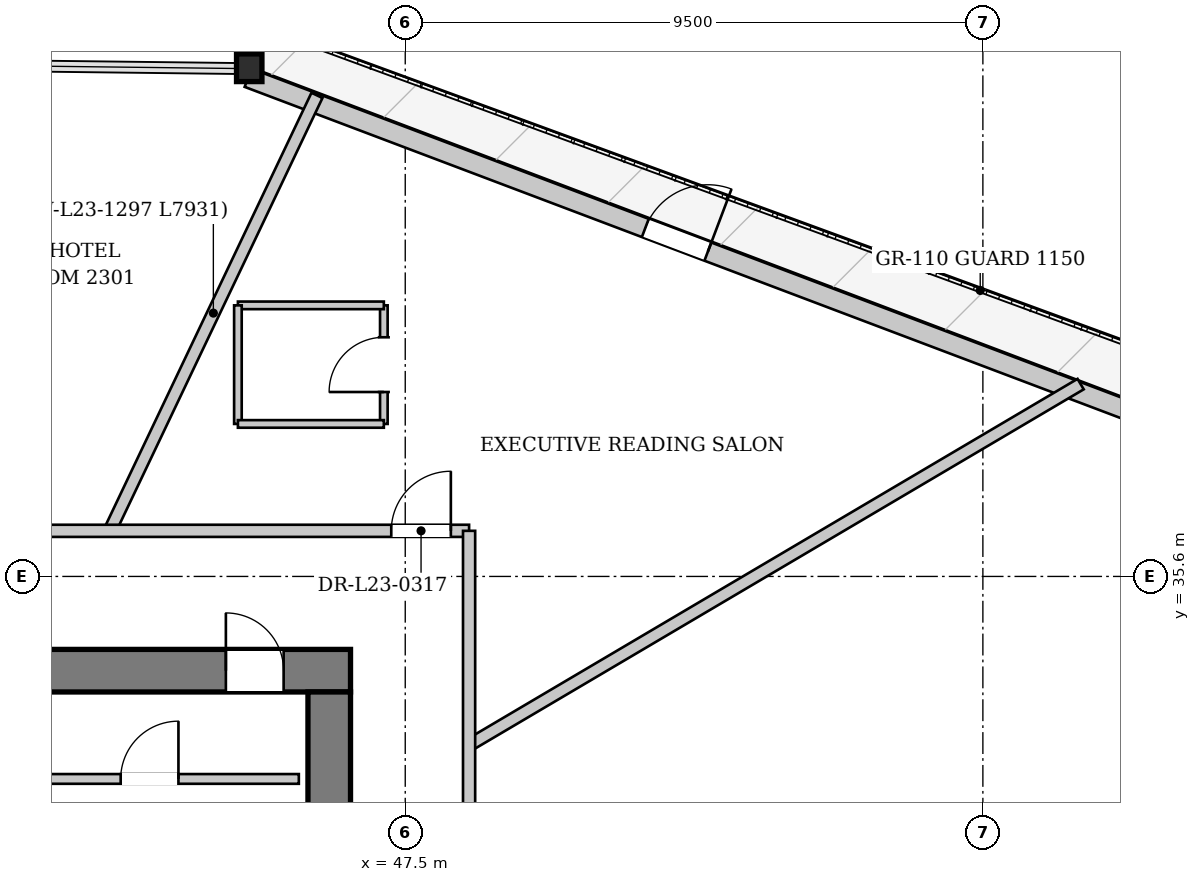
"""IFC4 building model, lengths in metres.
Left out: names, types, materials, properties, quantities, classifications, styles, units other than length and angle.
Written with IfcOpenShell. Run it as: python <this file> out.ifc"""

import sys

from ifc_helpers import new_model, si_unit, direction, frame, frame_2d, origin, origin_2d, place, context, subcontext, project, spatial, rectangle, i_section, extrude, source, transform, mapped, element, fill, save


model = new_model("IFC4")
c1 = context("Model", 3, precision=1e-05, world=origin(), true_north=direction((0.0, 1.0)))
c2 = subcontext(c1, "Body", "Model", "MODEL_VIEW")
j1 = project(units=[si_unit("LENGTHUNIT", "METRE"), si_unit("PLANEANGLEUNIT", "RADIAN")], contexts=[c1])
p1 = place(None, origin())
s1 = spatial("IfcSite", under=j1, at=p1, CompositionType="ELEMENT")
p2 = place(p1, origin())
s2 = spatial("IfcBuilding", under=s1, at=p2, CompositionType="ELEMENT")
p3 = place(p2, frame((0.0, 0.0, 91.5)))
s3 = spatial("IfcBuildingStorey", under=s2, at=p3, CompositionType="ELEMENT", Elevation=91.5)
m1 = source(origin(), c2, "Body", "SweptSolid", [
    extrude(i_section(OverallWidth=0.418, OverallDepth=0.455, WebThickness=0.038, FlangeThickness=0.059, at=origin_2d()), origin(), (0.0, 0.0, 1.0), 3.386),
])
p4 = place(p3, frame((44.972, 43.95, 0.0), z_axis=(-0.022424043653, 0.008940776247, 0.999708569927), x_axis=(-0.370360524269, -0.928888089095, 0.0)))
e1 = element("IfcColumn", 1, at=p4, inside=s3, PredefinedType="COLUMN", context=c2, shape_type="MappedRepresentation", body=[
    mapped(m1, transform((0.0, 0.0, 0.0), x_axis=(1.0, 0.0, 0.0), y_axis=(0.0, 1.0, 0.0), z_axis=(0.0, 0.0, 1.0), scale=1.0)),
])
p5 = place(p3, frame((44.916, 43.801, 0.0), z_axis=(0.0, 0.0, 1.0), x_axis=(0.935383996815, -0.353633678404, 0.0)))
e2 = element("IfcWall", 2, at=p5, inside=s3, PredefinedType="SOLIDWALL", context=c2, shape_type="SweptSolid", body=[
    extrude(rectangle(XDim=23.543, YDim=0.32, at=frame_2d((11.771, 0.0))), origin(), (0.0, 0.0, 1.0), 2.692),
])
p6 = place(p5, frame((6.984, 0.0, 0.0)))
e3 = element("IfcOpeningElement", 3, at=p6, cuts=e2, PredefinedType="OPENING", context=c2, shape_type="SweptSolid", body=[
    extrude(rectangle(XDim=1.1, YDim=2.3, at=frame_2d((0.55, 1.15))), frame((0.0, 0.17, 0.0), z_axis=(0.0, -1.0, 0.0), x_axis=(1.0, 0.0, 0.0)), (0.0, 0.0, 1.0), 0.34),
])
p7 = place(p5, frame((16.522, 0.0, 0.372)))
e4 = element("IfcOpeningElement", 4, at=p7, cuts=e2, PredefinedType="OPENING", context=c2, shape_type="SweptSolid", body=[
    extrude(rectangle(XDim=1.8, YDim=2.2, at=frame_2d((0.9, 1.1))), frame((0.0, 0.17, 0.0), z_axis=(0.0, -1.0, 0.0), x_axis=(1.0, 0.0, 0.0)), (0.0, 0.0, 1.0), 0.34),
])
p8 = place(p3, frame((29.4, 34.05, 0.0), z_axis=(0.0, 0.0, 1.0), x_axis=(1.0, 0.0, 0.0)))
e5 = element("IfcWall", 5, at=p8, inside=s3, PredefinedType="SHEAR", context=c2, shape_type="SweptSolid", body=[
    extrude(rectangle(XDim=17.2, YDim=0.7, at=frame_2d((8.6, 0.0))), origin(), (0.0, 0.0, 1.0), 3.3),
])
p9 = place(p8, frame((1.7, 0.0, 0.0)))
e6 = element("IfcOpeningElement", 6, at=p9, cuts=e5, PredefinedType="OPENING", context=c2, shape_type="SweptSolid", body=[
    extrude(rectangle(XDim=0.95, YDim=2.1, at=frame_2d((0.475, 1.05))), frame((0.0, 0.36, 0.0), z_axis=(0.0, -1.0, 0.0), x_axis=(1.0, 0.0, 0.0)), (0.0, 0.0, 1.0), 0.72),
])
p10 = place(p8, frame((4.08, 0.0, 0.0)))
e7 = element("IfcOpeningElement", 7, at=p10, cuts=e5, PredefinedType="OPENING", context=c2, shape_type="SweptSolid", body=[
    extrude(rectangle(XDim=1.32, YDim=2.2, at=frame_2d((0.66, 1.1))), frame((0.0, 0.36, 0.0), z_axis=(0.0, -1.0, 0.0), x_axis=(1.0, 0.0, 0.0)), (0.0, 0.0, 1.0), 0.72),
])
p11 = place(p8, frame((15.15, 0.0, 0.0)))
e8 = element("IfcOpeningElement", 8, at=p11, cuts=e5, PredefinedType="OPENING", context=c2, shape_type="SweptSolid", body=[
    extrude(rectangle(XDim=0.95, YDim=2.1, at=frame_2d((0.475, 1.05))), frame((0.0, 0.36, 0.0), z_axis=(0.0, -1.0, 0.0), x_axis=(1.0, 0.0, 0.0)), (0.0, 0.0, 1.0), 0.72),
])
p12 = place(p3, frame((46.25, 33.7, 0.0), z_axis=(0.0, 0.0, 1.0), x_axis=(0.0, -1.0, 0.0)))
e9 = element("IfcWall", 9, at=p12, inside=s3, PredefinedType="SHEAR", context=c2, shape_type="SweptSolid", body=[
    extrude(rectangle(XDim=14.2, YDim=0.7, at=frame_2d((7.1, 0.0))), origin(), (0.0, 0.0, 1.0), 3.3),
])
p13 = place(p12, frame((5.18, 0.0, 0.0)))
e10 = element("IfcOpeningElement", 10, at=p13, cuts=e9, PredefinedType="OPENING", context=c2, shape_type="SweptSolid", body=[
    extrude(rectangle(XDim=1.6, YDim=2.2, at=frame_2d((0.8, 1.1))), frame((0.0, 0.36, 0.0), z_axis=(0.0, -1.0, 0.0), x_axis=(1.0, 0.0, 0.0)), (0.0, 0.0, 1.0), 0.72),
])
p14 = place(p3, frame((40.72, 32.27, 0.0), z_axis=(0.0, 0.0, 1.0), x_axis=(1.0, 0.0, 0.0)))
e11 = element("IfcWall", 11, at=p14, inside=s3, PredefinedType="PARTITIONING", context=c2, shape_type="SweptSolid", body=[
    extrude(rectangle(XDim=5.03, YDim=0.16, at=frame_2d((2.515, 0.0))), origin(), (0.0, 0.0, 1.0), 3.3),
])
p15 = place(p14, frame((2.1, 0.0, 0.0)))
e12 = element("IfcOpeningElement", 12, at=p15, cuts=e11, PredefinedType="OPENING", context=c2, shape_type="SweptSolid", body=[
    extrude(rectangle(XDim=0.95, YDim=2.1, at=frame_2d((0.475, 1.05))), frame((0.0, 0.09, 0.0), z_axis=(0.0, -1.0, 0.0), x_axis=(1.0, 0.0, 0.0)), (0.0, 0.0, 1.0), 0.18),
])
p16 = place(p3, frame((42.64, 36.35, 0.0), z_axis=(0.0, 0.0, 1.0), x_axis=(0.429717281703, 0.902963486419, 0.0)))
e13 = element("IfcWall", 13, at=p16, inside=s3, PredefinedType="PARTITIONING", context=c2, shape_type="SweptSolid", body=[
    extrude(rectangle(XDim=7.931, YDim=0.2, at=frame_2d((3.965, 0.0))), origin(), (0.0, 0.0, 1.0), 3.3),
])
p17 = place(p3, frame((48.55, 32.827, 0.0), z_axis=(0.0, 0.0, 1.0), x_axis=(0.861183611316, 0.508293997212, 0.0)))
e14 = element("IfcWall", 14, at=p17, inside=s3, PredefinedType="PARTITIONING", context=c2, shape_type="SweptSolid", body=[
    extrude(rectangle(XDim=11.679, YDim=0.2, at=frame_2d((5.839, 0.0))), origin(), (0.0, 0.0, 1.0), 3.3),
])
p18 = place(p3, frame((47.148, 38.108, 0.0), z_axis=(0.0, 0.0, 1.0), x_axis=(0.0, 1.0, 0.0)))
e15 = element("IfcWall", 15, at=p18, inside=s3, PredefinedType="PARTITIONING", context=c2, shape_type="SweptSolid", body=[
    extrude(rectangle(XDim=1.95, YDim=0.125, at=frame_2d((0.975, 0.0))), origin(), (0.0, 0.0, 1.0), 3.3),
])
p19 = place(p18, frame((0.525, 0.0, 0.0)))
e16 = element("IfcOpeningElement", 16, at=p19, cuts=e15, PredefinedType="OPENING", context=c2, shape_type="SweptSolid", body=[
    extrude(rectangle(XDim=0.9, YDim=2.1, at=frame_2d((0.45, 1.05))), frame((0.0, 0.073, 0.0), z_axis=(0.0, -1.0, 0.0), x_axis=(1.0, 0.0, 0.0)), (0.0, 0.0, 1.0), 0.145),
])
p20 = place(p3, frame((47.148, 40.058, 0.0), z_axis=(0.0, 0.0, 1.0), x_axis=(-1.0, 0.0, 0.0)))
e17 = element("IfcWall", 17, at=p20, inside=s3, PredefinedType="PARTITIONING", context=c2, shape_type="SweptSolid", body=[
    extrude(rectangle(XDim=2.4, YDim=0.125, at=frame_2d((1.2, 0.0))), origin(), (0.0, 0.0, 1.0), 3.3),
])
p21 = place(p3, frame((44.748, 40.058, 0.0), z_axis=(0.0, 0.0, 1.0), x_axis=(0.0, -1.0, 0.0)))
e18 = element("IfcWall", 18, at=p21, inside=s3, PredefinedType="PARTITIONING", context=c2, shape_type="SweptSolid", body=[
    extrude(rectangle(XDim=1.95, YDim=0.125, at=frame_2d((0.975, 0.0))), origin(), (0.0, 0.0, 1.0), 3.3),
])
p22 = place(p3, frame((44.748, 38.108, 0.0), z_axis=(0.0, 0.0, 1.0), x_axis=(1.0, 0.0, 0.0)))
e19 = element("IfcWall", 19, at=p22, inside=s3, PredefinedType="PARTITIONING", context=c2, shape_type="SweptSolid", body=[
    extrude(rectangle(XDim=2.4, YDim=0.125, at=frame_2d((1.2, 0.0))), origin(), (0.0, 0.0, 1.0), 2.985),
])
p23 = place(p3, frame((27.45, 36.35, 0.0), z_axis=(0.0, 0.0, 1.0), x_axis=(1.0, 0.0, 0.0)))
e20 = element("IfcWall", 20, at=p23, inside=s3, PredefinedType="PARTITIONING", context=c2, shape_type="SweptSolid", body=[
    extrude(rectangle(XDim=21.1, YDim=0.2, at=frame_2d((10.55, 0.0))), origin(), (0.0, 0.0, 1.0), 3.3),
])
p24 = place(p23, frame((13.008, 0.0, 0.0)))
e21 = element("IfcOpeningElement", 21, at=p24, cuts=e20, PredefinedType="OPENING", context=c2, shape_type="SweptSolid", body=[
    extrude(rectangle(XDim=0.98, YDim=2.15, at=frame_2d((0.49, 1.075))), frame((0.0, 0.11, 0.0), z_axis=(0.0, -1.0, 0.0), x_axis=(1.0, 0.0, 0.0)), (0.0, 0.0, 1.0), 0.22),
])
p25 = place(p23, frame((1.25, 0.0, 0.0)))
e22 = element("IfcOpeningElement", 22, at=p25, cuts=e20, PredefinedType="OPENING", context=c2, shape_type="SweptSolid", body=[
    extrude(rectangle(XDim=0.98, YDim=2.15, at=frame_2d((0.49, 1.075))), frame((0.0, 0.11, 0.0), z_axis=(0.0, -1.0, 0.0), x_axis=(1.0, 0.0, 0.0)), (0.0, 0.0, 1.0), 0.22),
])
p26 = place(p23, frame((19.82, 0.0, 0.0)))
e23 = element("IfcOpeningElement", 23, at=p26, cuts=e20, PredefinedType="OPENING", context=c2, shape_type="SweptSolid", body=[
    extrude(rectangle(XDim=0.98, YDim=2.15, at=frame_2d((0.49, 1.075))), frame((0.0, 0.11, 0.0), z_axis=(0.0, -1.0, 0.0), x_axis=(1.0, 0.0, 0.0)), (0.0, 0.0, 1.0), 0.22),
])
p27 = place(p3, frame((48.55, 16.85, 0.0), z_axis=(0.0, 0.0, 1.0), x_axis=(0.0, 1.0, 0.0)))
e24 = element("IfcWall", 24, at=p27, inside=s3, PredefinedType="PARTITIONING", context=c2, shape_type="SweptSolid", body=[
    extrude(rectangle(XDim=19.5, YDim=0.2, at=frame_2d((9.75, 0.0))), origin(), (0.0, 0.0, 1.0), 3.3),
])
p28 = place(p27, frame((3.301, 0.0, 0.0)))
e25 = element("IfcOpeningElement", 25, at=p28, cuts=e24, PredefinedType="OPENING", context=c2, shape_type="SweptSolid", body=[
    extrude(rectangle(XDim=0.98, YDim=2.15, at=frame_2d((0.49, 1.075))), frame((0.0, 0.11, 0.0), z_axis=(0.0, -1.0, 0.0), x_axis=(1.0, 0.0, 0.0)), (0.0, 0.0, 1.0), 0.22),
])
p29 = place(p27, frame((11.264, 0.0, 0.0)))
e26 = element("IfcOpeningElement", 26, at=p29, cuts=e24, PredefinedType="OPENING", context=c2, shape_type="SweptSolid", body=[
    extrude(rectangle(XDim=0.98, YDim=2.15, at=frame_2d((0.49, 1.075))), frame((0.0, 0.11, 0.0), z_axis=(0.0, -1.0, 0.0), x_axis=(1.0, 0.0, 0.0)), (0.0, 0.0, 1.0), 0.22),
])
m2 = source(origin(), c2, "Body", "SweptSolid", [
    extrude(rectangle(XDim=1.1, YDim=2.3, at=frame_2d((0.55, 1.15))), frame((0.0, 0.025, 0.0), z_axis=(0.0, -1.0, 0.0), x_axis=(1.0, 0.0, 0.0)), (0.0, 0.0, 1.0), 0.05),
])
p30 = place(p6, origin())
e27 = element("IfcDoor", 27, at=p30, inside=s3, OperationType="SINGLE_SWING_RIGHT", PredefinedType="DOOR", context=c2, shape_type="MappedRepresentation", body=[
    mapped(m2, transform((0.0, 0.0, 0.0), x_axis=(1.0, 0.0, 0.0), y_axis=(0.0, 1.0, 0.0), z_axis=(0.0, 0.0, 1.0), scale=1.0)),
])
fill(e3, e27)
m3 = source(origin(), c2, "Body", "SweptSolid", [
    extrude(rectangle(XDim=0.95, YDim=2.1, at=frame_2d((0.475, 1.05))), frame((0.0, 0.025, 0.0), z_axis=(0.0, -1.0, 0.0), x_axis=(1.0, 0.0, 0.0)), (0.0, 0.0, 1.0), 0.05),
])
p31 = place(p15, origin())
e28 = element("IfcDoor", 28, at=p31, inside=s3, OperationType="SINGLE_SWING_RIGHT", PredefinedType="DOOR", context=c2, shape_type="MappedRepresentation", body=[
    mapped(m3, transform((0.0, 0.0, 0.0), x_axis=(1.0, 0.0, 0.0), y_axis=(0.0, 1.0, 0.0), z_axis=(0.0, 0.0, 1.0), scale=1.0)),
])
fill(e12, e28)
p32 = place(p11, origin())
e29 = element("IfcDoor", 29, at=p32, inside=s3, OperationType="SINGLE_SWING_LEFT", PredefinedType="DOOR", context=c2, shape_type="MappedRepresentation", body=[
    mapped(m3, transform((0.0, 0.0, 0.0), x_axis=(1.0, 0.0, 0.0), y_axis=(0.0, 1.0, 0.0), z_axis=(0.0, 0.0, 1.0), scale=1.0)),
])
fill(e8, e29)
m4 = source(origin(), c2, "Body", "SweptSolid", [
    extrude(rectangle(XDim=0.9, YDim=2.1, at=frame_2d((0.45, 1.05))), frame((0.0, 0.025, 0.0), z_axis=(0.0, -1.0, 0.0), x_axis=(1.0, 0.0, 0.0)), (0.0, 0.0, 1.0), 0.05),
])
p33 = place(p19, origin())
e30 = element("IfcDoor", 30, at=p33, inside=s3, OperationType="SINGLE_SWING_LEFT", PredefinedType="DOOR", context=c2, shape_type="MappedRepresentation", body=[
    mapped(m4, transform((0.0, 0.0, 0.0), x_axis=(1.0, 0.0, 0.0), y_axis=(0.0, 1.0, 0.0), z_axis=(0.0, 0.0, 1.0), scale=1.0)),
])
fill(e16, e30)
m5 = source(origin(), c2, "Body", "SweptSolid", [
    extrude(rectangle(XDim=0.98, YDim=2.15, at=frame_2d((0.49, 1.075))), frame((0.0, 0.025, 0.0), z_axis=(0.0, -1.0, 0.0), x_axis=(1.0, 0.0, 0.0)), (0.0, 0.0, 1.0), 0.05),
])
p34 = place(p26, origin())
e31 = element("IfcDoor", 31, at=p34, inside=s3, OperationType="SINGLE_SWING_RIGHT", PredefinedType="DOOR", context=c2, shape_type="MappedRepresentation", body=[
    mapped(m5, transform((0.0, 0.0, 0.0), x_axis=(1.0, 0.0, 0.0), y_axis=(0.0, 1.0, 0.0), z_axis=(0.0, 0.0, 1.0), scale=1.0)),
])
fill(e23, e31)
save(model, sys.argv[1])
